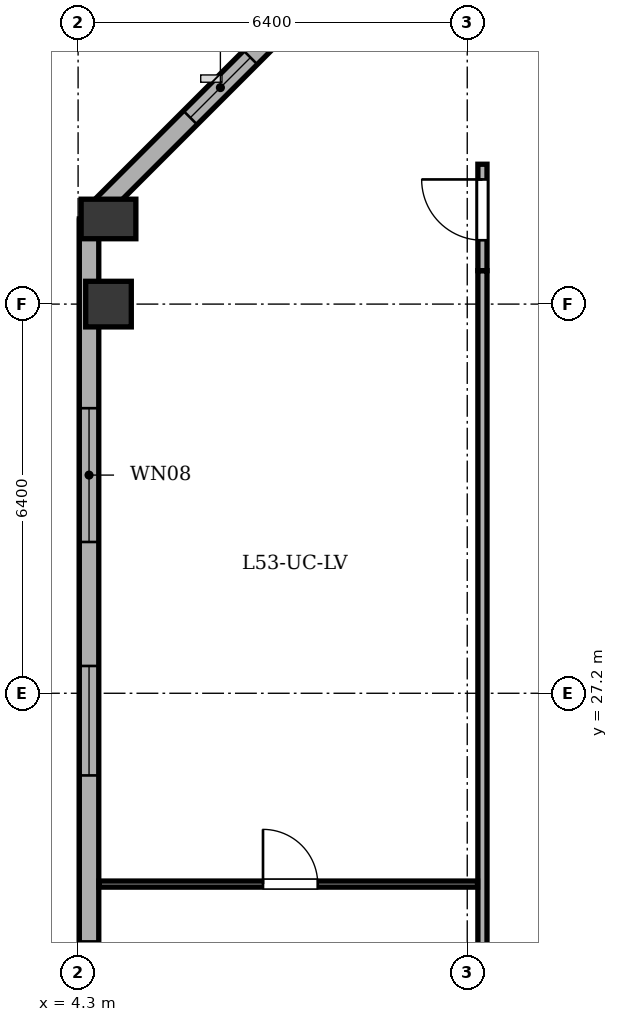
"""IFC4 building model, lengths in metres.
Left out: names, types, materials, properties, quantities, classifications, styles, units other than length and angle.
Written with IfcOpenShell. Run it as: python <this file> out.ifc"""

import sys

from ifc_helpers import new_model, si_unit, direction, frame, frame_2d, origin, origin_2d, place, context, subcontext, project, spatial, rectangle, extrude, element, fill, save


model = new_model("IFC4")
c1 = context("Model", 3, precision=1e-05, world=origin(), true_north=direction((0.0, 1.0)))
c2 = subcontext(c1, "Body", "Model", "MODEL_VIEW")
j1 = project(units=[si_unit("LENGTHUNIT", "METRE"), si_unit("PLANEANGLEUNIT", "RADIAN")], contexts=[c1])
p1 = place(None, origin())
s1 = spatial("IfcSite", under=j1, at=p1, CompositionType="ELEMENT")
p2 = place(p1, origin())
s2 = spatial("IfcBuilding", under=s1, at=p2, CompositionType="ELEMENT")
p3 = place(p2, frame((0.0, 0.0, 207.5)))
s3 = spatial("IfcBuildingStorey", under=s2, at=p3, CompositionType="ELEMENT", Elevation=207.5)
p4 = place(p3, frame((4.8, 33.6, 0.0), z_axis=(0.0, 0.0, 1.0), x_axis=(1.0, 0.0, 0.0)))
e1 = element("IfcColumn", 1, at=p4, inside=s3, PredefinedType="COLUMN", context=c2, shape_type="SweptSolid", body=[
    extrude(rectangle(XDim=0.75, YDim=0.75, at=origin_2d()), origin(), (0.0, 0.0, 1.0), 3.4),
])
p5 = place(p3, frame((4.8, 35.0, 0.0), z_axis=(0.0, 0.0, 1.0), x_axis=(1.0, 0.0, 0.0)))
e2 = element("IfcColumn", 2, at=p5, inside=s3, PredefinedType="COLUMN", context=c2, shape_type="SweptSolid", body=[
    extrude(rectangle(XDim=0.65, YDim=0.9, at=origin_2d()), origin(), (0.0, 0.0, 1.0), 3.4),
])
p6 = place(p3, frame((4.48, 7.2, 0.0), z_axis=(0.0, 0.0, 1.0), x_axis=(0.0, 1.0, 0.0)))
e3 = element("IfcWall", 3, at=p6, inside=s3, PredefinedType="STANDARD", context=c2, shape_type="SweptSolid", body=[
    extrude(rectangle(XDim=27.8, YDim=0.32, at=frame_2d((13.9, 0.0))), origin(), (0.0, 0.0, 1.0), 2.725),
])
p7 = place(p6, frame((4.73, 0.0, 0.75)))
e4 = element("IfcOpeningElement", 4, at=p7, cuts=e3, PredefinedType="OPENING", context=c2, shape_type="SweptSolid", body=[
    extrude(rectangle(XDim=1.8, YDim=1.7, at=frame_2d((0.9, 0.85))), frame((0.0, 0.17, 0.0), z_axis=(0.0, -1.0, 0.0), x_axis=(1.0, 0.0, 0.0)), (0.0, 0.0, 1.0), 0.34),
])
p8 = place(p6, frame((9.295, 0.0, 0.75)))
e5 = element("IfcOpeningElement", 5, at=p8, cuts=e3, PredefinedType="OPENING", context=c2, shape_type="SweptSolid", body=[
    extrude(rectangle(XDim=2.2, YDim=1.7, at=frame_2d((1.1, 0.85))), frame((0.0, 0.17, 0.0), z_axis=(0.0, -1.0, 0.0), x_axis=(1.0, 0.0, 0.0)), (0.0, 0.0, 1.0), 0.34),
])
p9 = place(p6, frame((14.669, 0.0, 0.75)))
e6 = element("IfcOpeningElement", 6, at=p9, cuts=e3, PredefinedType="OPENING", context=c2, shape_type="SweptSolid", body=[
    extrude(rectangle(XDim=1.25, YDim=1.7, at=frame_2d((0.625, 0.85))), frame((0.0, 0.17, 0.0), z_axis=(0.0, -1.0, 0.0), x_axis=(1.0, 0.0, 0.0)), (0.0, 0.0, 1.0), 0.34),
])
p10 = place(p6, frame((18.649, 0.0, 0.75)))
e7 = element("IfcOpeningElement", 7, at=p10, cuts=e3, PredefinedType="OPENING", context=c2, shape_type="SweptSolid", body=[
    extrude(rectangle(XDim=1.8, YDim=1.7, at=frame_2d((0.9, 0.85))), frame((0.0, 0.17, 0.0), z_axis=(0.0, -1.0, 0.0), x_axis=(1.0, 0.0, 0.0)), (0.0, 0.0, 1.0), 0.34),
])
p11 = place(p6, frame((22.488, 0.0, 0.75)))
e8 = element("IfcOpeningElement", 8, at=p11, cuts=e3, PredefinedType="OPENING", context=c2, shape_type="SweptSolid", body=[
    extrude(rectangle(XDim=2.2, YDim=1.7, at=frame_2d((1.1, 0.85))), frame((0.0, 0.17, 0.0), z_axis=(0.0, -1.0, 0.0), x_axis=(1.0, 0.0, 0.0)), (0.0, 0.0, 1.0), 0.34),
])
p12 = place(p3, frame((4.48, 35.0, 0.0), z_axis=(0.0, 0.0, 1.0), x_axis=(0.707106781187, 0.707106781187, 0.0)))
e9 = element("IfcWall", 9, at=p12, inside=s3, PredefinedType="STANDARD", context=c2, shape_type="SweptSolid", body=[
    extrude(rectangle(XDim=6.11, YDim=0.32, at=frame_2d((3.055, 0.0))), origin(), (0.0, 0.0, 1.0), 2.725),
])
p13 = place(p12, frame((2.355, 0.0, 0.75)))
e10 = element("IfcOpeningElement", 10, at=p13, cuts=e9, PredefinedType="OPENING", context=c2, shape_type="SweptSolid", body=[
    extrude(rectangle(XDim=1.4, YDim=1.65, at=frame_2d((0.7, 0.825))), frame((0.0, 0.17, 0.0), z_axis=(0.0, -1.0, 0.0), x_axis=(1.0, 0.0, 0.0)), (0.0, 0.0, 1.0), 0.34),
])
p14 = place(p3, frame((10.95, 20.25, 0.0), z_axis=(0.0, 0.0, 1.0), x_axis=(0.0, 1.0, 0.0)))
e11 = element("IfcWall", 11, at=p14, inside=s3, PredefinedType="PARTITIONING", context=c2, shape_type="SweptSolid", body=[
    extrude(rectangle(XDim=13.9, YDim=0.15, at=frame_2d((6.95, 0.0))), origin(), (0.0, 0.0, 1.0), 3.1),
])
p15 = place(p3, frame((10.95, 34.15, 0.0), z_axis=(0.0, 0.0, 1.0), x_axis=(0.0, 1.0, 0.0)))
e12 = element("IfcWall", 12, at=p15, inside=s3, PredefinedType="PARTITIONING", context=c2, shape_type="SweptSolid", body=[
    extrude(rectangle(XDim=1.75, YDim=0.15, at=frame_2d((0.875, 0.0))), origin(), (0.0, 0.0, 1.0), 3.1),
])
p16 = place(p15, frame((0.5, 0.0, 0.0)))
e13 = element("IfcOpeningElement", 13, at=p16, cuts=e12, PredefinedType="OPENING", context=c2, shape_type="SweptSolid", body=[
    extrude(rectangle(XDim=1.0, YDim=2.1, at=frame_2d((0.5, 1.05))), frame((0.0, 0.085, 0.0), z_axis=(0.0, -1.0, 0.0), x_axis=(1.0, 0.0, 0.0)), (0.0, 0.0, 1.0), 0.17),
])
p17 = place(p3, frame((4.645, 24.062, 0.0), z_axis=(0.0, 0.0, 1.0), x_axis=(1.0, 0.0, 0.0)))
e14 = element("IfcWall", 14, at=p17, inside=s3, PredefinedType="PARTITIONING", context=c2, shape_type="SweptSolid", body=[
    extrude(rectangle(XDim=6.225, YDim=0.1, at=frame_2d((3.113, 0.0))), origin(), (0.0, 0.0, 1.0), 3.1),
])
p18 = place(p17, frame((2.696, 0.0, 0.0)))
e15 = element("IfcOpeningElement", 15, at=p18, cuts=e14, PredefinedType="OPENING", context=c2, shape_type="SweptSolid", body=[
    extrude(rectangle(XDim=0.9, YDim=2.05, at=frame_2d((0.45, 1.025))), frame((0.0, 0.06, 0.0), z_axis=(0.0, -1.0, 0.0), x_axis=(1.0, 0.0, 0.0)), (0.0, 0.0, 1.0), 0.12),
])
p19 = place(p9, origin())
e16 = element("IfcWindow", 16, at=p19, inside=s3, PartitioningType="SINGLE_PANEL", PredefinedType="WINDOW", context=c2, shape_type="SweptSolid", body=[
    extrude(rectangle(XDim=1.25, YDim=1.7, at=frame_2d((0.625, 0.85))), frame((0.0, -0.01, 0.0), z_axis=(0.0, -1.0, 0.0), x_axis=(1.0, 0.0, 0.0)), (0.0, 0.0, 1.0), 0.06),
])
fill(e6, e16)
p20 = place(p10, origin())
e17 = element("IfcWindow", 17, at=p20, inside=s3, PartitioningType="SINGLE_PANEL", PredefinedType="WINDOW", context=c2, shape_type="SweptSolid", body=[
    extrude(rectangle(XDim=1.8, YDim=1.7, at=frame_2d((0.9, 0.85))), frame((0.0, -0.01, 0.0), z_axis=(0.0, -1.0, 0.0), x_axis=(1.0, 0.0, 0.0)), (0.0, 0.0, 1.0), 0.06),
])
fill(e7, e17)
p21 = place(p11, origin())
e18 = element("IfcWindow", 18, at=p21, inside=s3, PartitioningType="SINGLE_PANEL", PredefinedType="WINDOW", context=c2, shape_type="SweptSolid", body=[
    extrude(rectangle(XDim=2.2, YDim=1.7, at=frame_2d((1.1, 0.85))), frame((0.0, -0.01, 0.0), z_axis=(0.0, -1.0, 0.0), x_axis=(1.0, 0.0, 0.0)), (0.0, 0.0, 1.0), 0.06),
])
fill(e8, e18)
p22 = place(p13, origin())
e19 = element("IfcWindow", 19, at=p22, inside=s3, PartitioningType="SINGLE_PANEL", PredefinedType="WINDOW", context=c2, shape_type="SweptSolid", body=[
    extrude(rectangle(XDim=1.4, YDim=1.65, at=frame_2d((0.7, 0.825))), frame((0.0, -0.01, 0.0), z_axis=(0.0, -1.0, 0.0), x_axis=(1.0, 0.0, 0.0)), (0.0, 0.0, 1.0), 0.06),
])
fill(e10, e19)
p23 = place(p16, origin())
e20 = element("IfcDoor", 20, at=p23, inside=s3, OperationType="SINGLE_SWING_RIGHT", PredefinedType="DOOR", context=c2, shape_type="SweptSolid", body=[
    extrude(rectangle(XDim=1.0, YDim=2.1, at=frame_2d((0.5, 1.05))), frame((0.0, 0.025, 0.0), z_axis=(0.0, -1.0, 0.0), x_axis=(1.0, 0.0, 0.0)), (0.0, 0.0, 1.0), 0.05),
])
fill(e13, e20)
p24 = place(p18, origin())
e21 = element("IfcDoor", 21, at=p24, inside=s3, OperationType="SINGLE_SWING_LEFT", PredefinedType="DOOR", context=c2, shape_type="SweptSolid", body=[
    extrude(rectangle(XDim=0.9, YDim=2.05, at=frame_2d((0.45, 1.025))), frame((0.0, 0.025, 0.0), z_axis=(0.0, -1.0, 0.0), x_axis=(1.0, 0.0, 0.0)), (0.0, 0.0, 1.0), 0.05),
])
fill(e15, e21)
save(model, sys.argv[1])
